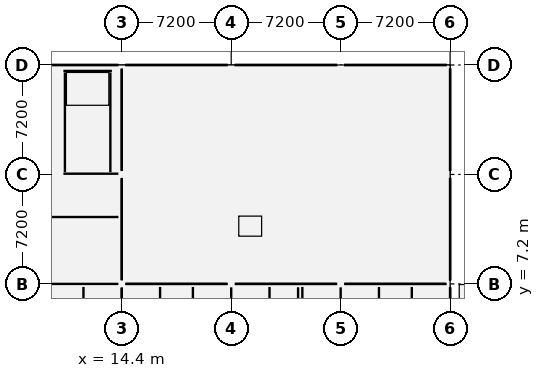
"""IFC4 building model, lengths in metres.
Left out: names, types, materials, properties, quantities, classifications, styles, units other than length and angle.
Written with IfcOpenShell. Run it as: python <this file> out.ifc"""

import sys

from ifc_helpers import new_model, si_unit, direction, frame, frame_2d, origin, origin_2d, place, context, subcontext, project, spatial, rectangle, extrude, element, fill, save


model = new_model("IFC4")
c1 = context("Model", 3, precision=1e-05, world=origin(), true_north=direction((0.0, 1.0)))
c2 = subcontext(c1, "Body", "Model", "MODEL_VIEW")
j1 = project(units=[si_unit("LENGTHUNIT", "METRE"), si_unit("PLANEANGLEUNIT", "RADIAN")], contexts=[c1])
p1 = place(None, origin())
s1 = spatial("IfcSite", under=j1, at=p1, CompositionType="ELEMENT")
p2 = place(p1, origin())
s2 = spatial("IfcBuilding", under=s1, at=p2, CompositionType="ELEMENT")
p3 = place(p2, frame((0.0, 0.0, 5.4)))
s3 = spatial("IfcBuildingStorey", under=s2, at=p3, CompositionType="ELEMENT", Elevation=5.4)
for number, where, z_axis, x_axis in (
    (1, (14.4, 7.2, 0.0), (0.0, 0.0, 1.0), (1.0, 0.0, 0.0)),
    (2, (14.4, 14.4, 0.0), (0.0, 0.0, 1.0), (1.0, 0.0, 0.0)),
    (3, (14.4, 21.6, 0.0), (0.0, 0.0, 1.0), (1.0, 0.0, 0.0)),
    (4, (21.6, 7.2, 0.0), (0.0, 0.0, 1.0), (1.0, 0.0, 0.0)),
    (5, (21.6, 21.6, 0.0), (0.0, 0.0, 1.0), (1.0, 0.0, 0.0)),
    (6, (28.8, 7.2, 0.0), (0.0, 0.0, 1.0), (1.0, 0.0, 0.0)),
    (7, (28.8, 21.6, 0.0), (0.0, 0.0, 1.0), (1.0, 0.0, 0.0)),
    (8, (36.0, 7.2, 0.0), (0.0, 0.0, 1.0), (1.0, 0.0, 0.0)),
    (9, (36.0, 14.4, 0.0), (0.0, 0.0, 1.0), (1.0, 0.0, 0.0)),
    (10, (36.0, 21.6, 0.0), (0.0, 0.0, 1.0), (1.0, 0.0, 0.0)),
):
    element("IfcColumn", number, at=place(p3, frame(where, z_axis=z_axis, x_axis=x_axis)), inside=s3, PredefinedType="COLUMN", context=c2, shape_type="SweptSolid", body=[
        extrude(rectangle(XDim=0.45, YDim=0.45, at=origin_2d()), origin(), (0.0, 0.0, 1.0), 4.2),
    ])
p4 = place(p3, frame((10.56, 14.45, 0.0), z_axis=(0.0, 0.0, 1.0), x_axis=(1.0, 0.0, 0.0)))
e11 = element("IfcWall", 11, at=p4, inside=s3, PredefinedType="SHEAR", context=c2, shape_type="SweptSolid", body=[
    extrude(rectangle(XDim=3.615, YDim=0.2, at=frame_2d((1.808, 0.0))), origin(), (0.0, 0.0, 1.0), 3.95),
])
p5 = place(p4, frame((1.258, 0.0, 0.0)))
e12 = element("IfcOpeningElement", 12, at=p5, cuts=e11, PredefinedType="OPENING", context=c2, shape_type="SweptSolid", body=[
    extrude(rectangle(XDim=1.1, YDim=2.15, at=frame_2d((0.55, 1.075))), frame((0.0, 0.112, 0.0), z_axis=(0.0, -1.0, 0.0), x_axis=(1.0, 0.0, 0.0)), (0.0, 0.0, 1.0), 0.224),
])
p6 = place(p3, frame((10.56, 21.21, 0.0), z_axis=(0.0, 0.0, 1.0), x_axis=(1.0, 0.0, 0.0)))
e13 = element("IfcWall", 13, at=p6, inside=s3, PredefinedType="SHEAR", context=c2, shape_type="SweptSolid", body=[
    extrude(rectangle(XDim=3.19, YDim=0.2, at=frame_2d((1.595, 0.0))), origin(), (0.0, 0.0, 1.0), 3.95),
])
for number, where, z_axis, x_axis in (
    (14, (10.66, 14.55, 0.0), (0.0, 0.0, 1.0), (0.0, 1.0, 0.0)),
    (15, (13.65, 14.55, 0.0), (0.0, 0.0, 1.0), (0.0, 1.0, 0.0)),
):
    element("IfcWall", number, at=place(p3, frame(where, z_axis=z_axis, x_axis=x_axis)), inside=s3, PredefinedType="SHEAR", context=c2, shape_type="SweptSolid", body=[
        extrude(rectangle(XDim=6.56, YDim=0.2, at=frame_2d((3.28, 0.0))), origin(), (0.0, 0.0, 1.0), 3.95),
    ])
p7 = place(p3, frame((36.0, 7.425, 0.0), z_axis=(0.0, 0.0, 1.0), x_axis=(0.0, 1.0, 0.0)))
e16 = element("IfcWall", 16, at=p7, inside=s3, PredefinedType="ELEMENTEDWALL", context=c2, shape_type="SweptSolid", body=[
    extrude(rectangle(XDim=6.75, YDim=0.32, at=frame_2d((3.375, 0.0))), origin(), (0.0, 0.0, 1.0), 3.29),
])
p8 = place(p7, frame((2.475, 0.0, 0.85)))
e17 = element("IfcOpeningElement", 17, at=p8, cuts=e16, PredefinedType="OPENING", context=c2, shape_type="SweptSolid", body=[
    extrude(rectangle(XDim=1.8, YDim=2.2, at=frame_2d((0.9, 1.1))), frame((0.0, 0.172, 0.0), z_axis=(0.0, -1.0, 0.0), x_axis=(1.0, 0.0, 0.0)), (0.0, 0.0, 1.0), 0.344),
])
p9 = place(p3, frame((36.0, 14.625, 0.0), z_axis=(0.0, 0.0, 1.0), x_axis=(0.0, 1.0, 0.0)))
e18 = element("IfcWall", 18, at=p9, inside=s3, PredefinedType="ELEMENTEDWALL", context=c2, shape_type="SweptSolid", body=[
    extrude(rectangle(XDim=6.75, YDim=0.32, at=frame_2d((3.375, 0.0))), origin(), (0.0, 0.0, 1.0), 3.34),
])
p10 = place(p9, frame((2.925, 0.0, 0.85)))
e19 = element("IfcOpeningElement", 19, at=p10, cuts=e18, PredefinedType="OPENING", context=c2, shape_type="SweptSolid", body=[
    extrude(rectangle(XDim=0.9, YDim=2.0, at=frame_2d((0.45, 1.0))), frame((0.0, 0.172, 0.0), z_axis=(0.0, -1.0, 0.0), x_axis=(1.0, 0.0, 0.0)), (0.0, 0.0, 1.0), 0.344),
])
p11 = place(p3, frame((35.775, 21.6, 0.0), z_axis=(0.0, 0.0, 1.0), x_axis=(-1.0, 0.0, 0.0)))
e20 = element("IfcWall", 20, at=p11, inside=s3, PredefinedType="ELEMENTEDWALL", context=c2, shape_type="SweptSolid", body=[
    extrude(rectangle(XDim=6.75, YDim=0.32, at=frame_2d((3.375, 0.0))), origin(), (0.0, 0.0, 1.0), 3.24),
])
p12 = place(p11, frame((2.7, 0.0, 0.85)))
e21 = element("IfcOpeningElement", 21, at=p12, cuts=e20, PredefinedType="OPENING", context=c2, shape_type="SweptSolid", body=[
    extrude(rectangle(XDim=1.35, YDim=2.0, at=frame_2d((0.675, 1.0))), frame((0.0, 0.172, 0.0), z_axis=(0.0, -1.0, 0.0), x_axis=(1.0, 0.0, 0.0)), (0.0, 0.0, 1.0), 0.344),
])
p13 = place(p3, frame((28.575, 21.6, 0.0), z_axis=(0.0, 0.0, 1.0), x_axis=(-1.0, 0.0, 0.0)))
e22 = element("IfcWall", 22, at=p13, inside=s3, PredefinedType="ELEMENTEDWALL", context=c2, shape_type="SweptSolid", body=[
    extrude(rectangle(XDim=6.75, YDim=0.32, at=frame_2d((3.375, 0.0))), origin(), (0.0, 0.0, 1.0), 3.19),
])
p14 = place(p13, frame((2.475, 0.0, 0.85)))
e23 = element("IfcOpeningElement", 23, at=p14, cuts=e22, PredefinedType="OPENING", context=c2, shape_type="SweptSolid", body=[
    extrude(rectangle(XDim=1.8, YDim=1.95, at=frame_2d((0.9, 0.975))), frame((0.0, 0.172, 0.0), z_axis=(0.0, -1.0, 0.0), x_axis=(1.0, 0.0, 0.0)), (0.0, 0.0, 1.0), 0.344),
])
p15 = place(p3, frame((21.375, 21.6, 0.0), z_axis=(0.0, 0.0, 1.0), x_axis=(-1.0, 0.0, 0.0)))
e24 = element("IfcWall", 24, at=p15, inside=s3, PredefinedType="ELEMENTEDWALL", context=c2, shape_type="SweptSolid", body=[
    extrude(rectangle(XDim=6.75, YDim=0.32, at=frame_2d((3.375, 0.0))), origin(), (0.0, 0.0, 1.0), 3.24),
])
p16 = place(p15, frame((2.825, 0.0, 0.85)))
e25 = element("IfcOpeningElement", 25, at=p16, cuts=e24, PredefinedType="OPENING", context=c2, shape_type="SweptSolid", body=[
    extrude(rectangle(XDim=1.1, YDim=1.75, at=frame_2d((0.55, 0.875))), frame((0.0, 0.172, 0.0), z_axis=(0.0, -1.0, 0.0), x_axis=(1.0, 0.0, 0.0)), (0.0, 0.0, 1.0), 0.344),
])
p17 = place(p3, frame((14.175, 21.6, 0.0), z_axis=(0.0, 0.0, 1.0), x_axis=(-1.0, 0.0, 0.0)))
e26 = element("IfcWall", 26, at=p17, inside=s3, PredefinedType="ELEMENTEDWALL", context=c2, shape_type="SweptSolid", body=[
    extrude(rectangle(XDim=6.75, YDim=0.32, at=frame_2d((3.375, 0.0))), origin(), (0.0, 0.0, 1.0), 3.19),
])
p18 = place(p17, frame((2.725, 0.0, 0.85)))
e27 = element("IfcOpeningElement", 27, at=p18, cuts=e26, PredefinedType="OPENING", context=c2, shape_type="SweptSolid", body=[
    extrude(rectangle(XDim=1.3, YDim=1.85, at=frame_2d((0.65, 0.925))), frame((0.0, 0.172, 0.0), z_axis=(0.0, -1.0, 0.0), x_axis=(1.0, 0.0, 0.0)), (0.0, 0.0, 1.0), 0.344),
])
p19 = place(p3, frame((14.4, 7.465, 0.0), z_axis=(0.0, 0.0, 1.0), x_axis=(0.0, 1.0, 0.0)))
e28 = element("IfcWall", 28, at=p19, inside=s3, PredefinedType="STANDARD", context=c2, shape_type="SweptSolid", body=[
    extrude(rectangle(XDim=6.67, YDim=0.15, at=frame_2d((3.335, 0.0))), origin(), (0.0, 0.0, 1.0), 3.338),
])
p20 = place(p19, frame((2.585, 0.0, 0.0)))
e29 = element("IfcOpeningElement", 29, at=p20, cuts=e28, PredefinedType="OPENING", context=c2, shape_type="SweptSolid", body=[
    extrude(rectangle(XDim=1.5, YDim=2.2, at=frame_2d((0.75, 1.1))), frame((0.0, 0.087, 0.0), z_axis=(0.0, -1.0, 0.0), x_axis=(1.0, 0.0, 0.0)), (0.0, 0.0, 1.0), 0.174),
])
p21 = place(p3, frame((14.4, 14.665, 0.0), z_axis=(0.0, 0.0, 1.0), x_axis=(0.0, 1.0, 0.0)))
e30 = element("IfcWall", 30, at=p21, inside=s3, PredefinedType="STANDARD", context=c2, shape_type="SweptSolid", body=[
    extrude(rectangle(XDim=6.67, YDim=0.15, at=frame_2d((3.335, 0.0))), origin(), (0.0, 0.0, 1.0), 3.288),
])
p22 = place(p3, frame((14.665, 7.2, 0.0), z_axis=(0.0, 0.0, 1.0), x_axis=(1.0, 0.0, 0.0)))
e31 = element("IfcWall", 31, at=p22, inside=s3, PredefinedType="STANDARD", context=c2, shape_type="SweptSolid", body=[
    extrude(rectangle(XDim=6.67, YDim=0.15, at=frame_2d((3.335, 0.0))), origin(), (0.0, 0.0, 1.0), 3.198),
])
p23 = place(p3, frame((21.865, 7.2, 0.0), z_axis=(0.0, 0.0, 1.0), x_axis=(1.0, 0.0, 0.0)))
e32 = element("IfcWall", 32, at=p23, inside=s3, PredefinedType="STANDARD", context=c2, shape_type="SweptSolid", body=[
    extrude(rectangle(XDim=6.67, YDim=0.15, at=frame_2d((3.335, 0.0))), origin(), (0.0, 0.0, 1.0), 3.248),
])
p24 = place(p3, frame((29.065, 7.2, 0.0), z_axis=(0.0, 0.0, 1.0), x_axis=(1.0, 0.0, 0.0)))
e33 = element("IfcWall", 33, at=p24, inside=s3, PredefinedType="STANDARD", context=c2, shape_type="SweptSolid", body=[
    extrude(rectangle(XDim=6.67, YDim=0.15, at=frame_2d((3.335, 0.0))), origin(), (0.0, 0.0, 1.0), 3.198),
])
p25 = place(p3, frame((14.4, 0.265, 0.0), z_axis=(0.0, 0.0, 1.0), x_axis=(0.0, 1.0, 0.0)))
e34 = element("IfcWall", 34, at=p25, inside=s3, PredefinedType="PARTITIONING", context=c2, shape_type="SweptSolid", body=[
    extrude(rectangle(XDim=6.67, YDim=0.12, at=frame_2d((3.335, 0.0))), origin(), (0.0, 0.0, 1.0), 3.288),
])
p26 = place(p25, frame((2.81, 0.0, 0.0)))
e35 = element("IfcOpeningElement", 35, at=p26, cuts=e34, PredefinedType="OPENING", context=c2, shape_type="SweptSolid", body=[
    extrude(rectangle(XDim=1.05, YDim=2.15, at=frame_2d((0.525, 1.075))), frame((0.0, 0.072, 0.0), z_axis=(0.0, -1.0, 0.0), x_axis=(1.0, 0.0, 0.0)), (0.0, 0.0, 1.0), 0.144),
])
p27 = place(p3, frame((26.0, 0.0, 0.0), z_axis=(0.0, 0.0, 1.0), x_axis=(0.0, 1.0, 0.0)))
e36 = element("IfcWall", 36, at=p27, inside=s3, PredefinedType="PARTITIONING", context=c2, shape_type="SweptSolid", body=[
    extrude(rectangle(XDim=6.98, YDim=0.12, at=frame_2d((3.49, 0.0))), origin(), (0.0, 0.0, 1.0), 3.248),
])
p28 = place(p27, frame((2.965, 0.0, 0.0)))
e37 = element("IfcOpeningElement", 37, at=p28, cuts=e36, PredefinedType="OPENING", context=c2, shape_type="SweptSolid", body=[
    extrude(rectangle(XDim=1.05, YDim=2.15, at=frame_2d((0.525, 1.075))), frame((0.0, 0.072, 0.0), z_axis=(0.0, -1.0, 0.0), x_axis=(1.0, 0.0, 0.0)), (0.0, 0.0, 1.0), 0.144),
])
p29 = place(p3, frame((0.22, 11.6, 0.0), z_axis=(0.0, 0.0, 1.0), x_axis=(1.0, 0.0, 0.0)))
e38 = element("IfcWall", 38, at=p29, inside=s3, PredefinedType="PLUMBINGWALL", context=c2, shape_type="SweptSolid", body=[
    extrude(rectangle(XDim=13.96, YDim=0.18, at=frame_2d((6.98, 0.0))), origin(), (0.0, 0.0, 1.0), 3.288),
])
p30 = place(p29, frame((6.53, 0.0, 0.0)))
e39 = element("IfcOpeningElement", 39, at=p30, cuts=e38, PredefinedType="OPENING", context=c2, shape_type="SweptSolid", body=[
    extrude(rectangle(XDim=0.9, YDim=2.1, at=frame_2d((0.45, 1.05))), frame((0.0, 0.102, 0.0), z_axis=(0.0, -1.0, 0.0), x_axis=(1.0, 0.0, 0.0)), (0.0, 0.0, 1.0), 0.204),
])
p31 = place(p8, origin())
e40 = element("IfcWindow", 40, at=p31, inside=s3, PartitioningType="SINGLE_PANEL", PredefinedType="WINDOW", context=c2, shape_type="SweptSolid", body=[
    extrude(rectangle(XDim=1.8, YDim=2.2, at=frame_2d((0.9, 1.1))), frame((0.0, 0.03, 0.0), z_axis=(0.0, -1.0, 0.0), x_axis=(1.0, 0.0, 0.0)), (0.0, 0.0, 1.0), 0.06),
])
fill(e17, e40)
p32 = place(p10, origin())
e41 = element("IfcWindow", 41, at=p32, inside=s3, PartitioningType="SINGLE_PANEL", PredefinedType="WINDOW", context=c2, shape_type="SweptSolid", body=[
    extrude(rectangle(XDim=0.9, YDim=2.0, at=frame_2d((0.45, 1.0))), frame((0.0, 0.03, 0.0), z_axis=(0.0, -1.0, 0.0), x_axis=(1.0, 0.0, 0.0)), (0.0, 0.0, 1.0), 0.06),
])
fill(e19, e41)
p33 = place(p12, origin())
e42 = element("IfcWindow", 42, at=p33, inside=s3, PartitioningType="SINGLE_PANEL", PredefinedType="WINDOW", context=c2, shape_type="SweptSolid", body=[
    extrude(rectangle(XDim=1.35, YDim=2.0, at=frame_2d((0.675, 1.0))), frame((0.0, 0.03, 0.0), z_axis=(0.0, -1.0, 0.0), x_axis=(1.0, 0.0, 0.0)), (0.0, 0.0, 1.0), 0.06),
])
fill(e21, e42)
p34 = place(p14, origin())
e43 = element("IfcWindow", 43, at=p34, inside=s3, PartitioningType="SINGLE_PANEL", PredefinedType="WINDOW", context=c2, shape_type="SweptSolid", body=[
    extrude(rectangle(XDim=1.8, YDim=1.95, at=frame_2d((0.9, 0.975))), frame((0.0, 0.03, 0.0), z_axis=(0.0, -1.0, 0.0), x_axis=(1.0, 0.0, 0.0)), (0.0, 0.0, 1.0), 0.06),
])
fill(e23, e43)
p35 = place(p16, origin())
e44 = element("IfcWindow", 44, at=p35, inside=s3, PartitioningType="SINGLE_PANEL", PredefinedType="WINDOW", context=c2, shape_type="SweptSolid", body=[
    extrude(rectangle(XDim=1.1, YDim=1.75, at=frame_2d((0.55, 0.875))), frame((0.0, 0.03, 0.0), z_axis=(0.0, -1.0, 0.0), x_axis=(1.0, 0.0, 0.0)), (0.0, 0.0, 1.0), 0.06),
])
fill(e25, e44)
p36 = place(p18, origin())
e45 = element("IfcWindow", 45, at=p36, inside=s3, PartitioningType="SINGLE_PANEL", PredefinedType="WINDOW", context=c2, shape_type="SweptSolid", body=[
    extrude(rectangle(XDim=1.3, YDim=1.85, at=frame_2d((0.65, 0.925))), frame((0.0, 0.03, 0.0), z_axis=(0.0, -1.0, 0.0), x_axis=(1.0, 0.0, 0.0)), (0.0, 0.0, 1.0), 0.06),
])
fill(e27, e45)
p37 = place(p5, origin())
e46 = element("IfcDoor", 46, at=p37, inside=s3, OperationType="SINGLE_SWING_LEFT", PredefinedType="DOOR", context=c2, shape_type="SweptSolid", body=[
    extrude(rectangle(XDim=1.1, YDim=2.15, at=frame_2d((0.55, 1.075))), frame((0.0, 0.025, 0.0), z_axis=(0.0, -1.0, 0.0), x_axis=(1.0, 0.0, 0.0)), (0.0, 0.0, 1.0), 0.05),
])
fill(e12, e46)
p38 = place(p20, origin())
e47 = element("IfcDoor", 47, at=p38, inside=s3, OperationType="DOUBLE_SWING_LEFT", PredefinedType="DOOR", context=c2, shape_type="SweptSolid", body=[
    extrude(rectangle(XDim=1.5, YDim=2.2, at=frame_2d((0.75, 1.1))), frame((0.0, 0.025, 0.0), z_axis=(0.0, -1.0, 0.0), x_axis=(1.0, 0.0, 0.0)), (0.0, 0.0, 1.0), 0.05),
])
fill(e29, e47)
save(model, sys.argv[1])
